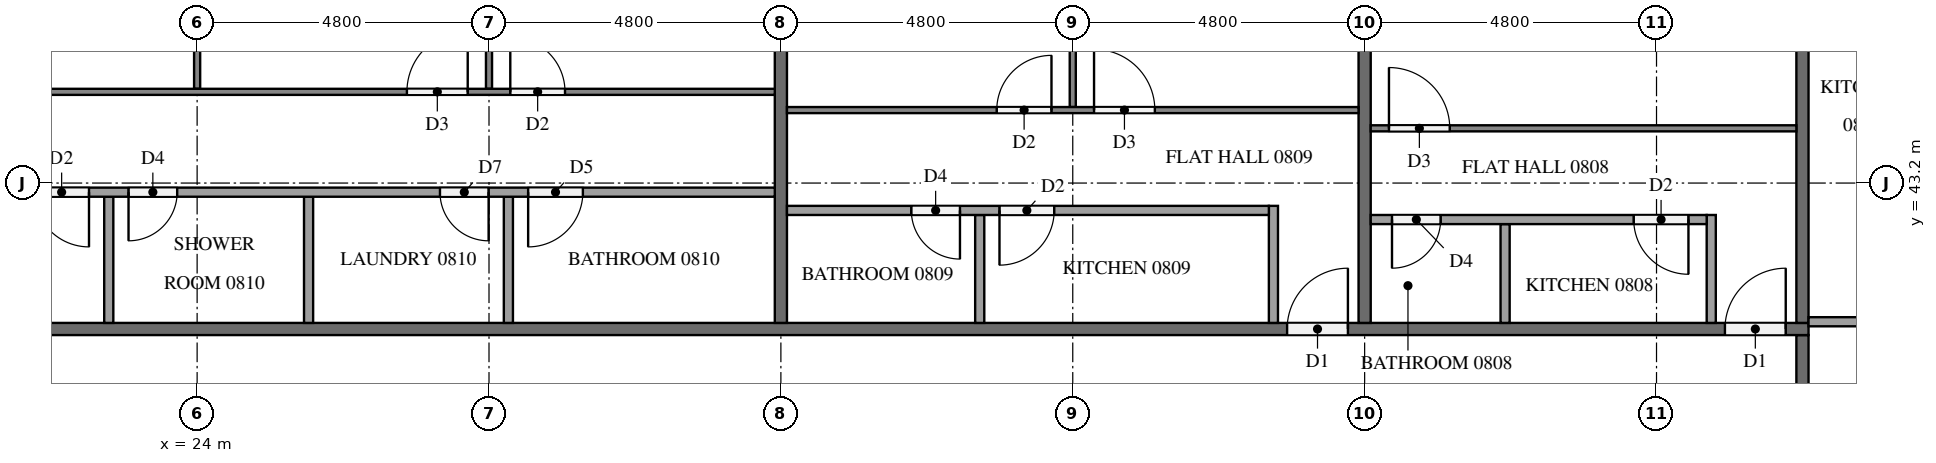
"""IFC4 building model, lengths in metres.
Left out: names, types, materials, properties, quantities, classifications, styles, units other than length and angle.
Written with IfcOpenShell. Run it as: python <this file> out.ifc"""

import sys

from ifc_helpers import new_model, si_unit, direction, frame, frame_2d, origin, place, context, subcontext, project, spatial, rectangle, extrude, element, fill, save


model = new_model("IFC4")
c1 = context("Model", 3, precision=1e-05, world=origin(), true_north=direction((0.0, 1.0)))
c2 = subcontext(c1, "Body", "Model", "MODEL_VIEW")
j1 = project(units=[si_unit("LENGTHUNIT", "METRE"), si_unit("PLANEANGLEUNIT", "RADIAN")], contexts=[c1])
p1 = place(None, origin())
s1 = spatial("IfcSite", under=j1, at=p1, CompositionType="ELEMENT")
p2 = place(p1, origin())
s2 = spatial("IfcBuilding", under=s1, at=p2, CompositionType="ELEMENT")
p3 = place(p2, frame((0.0, 0.0, 36.4)))
s3 = spatial("IfcBuildingStorey", under=s2, at=p3, CompositionType="ELEMENT", Elevation=36.4)
p4 = place(p3, frame((50.4, 40.7, 0.0), z_axis=(0.0, 0.0, 1.0), x_axis=(0.0, -1.0, 0.0)))
e1 = element("IfcWall", 1, at=p4, inside=s3, PredefinedType="PARTITIONING", context=c2, shape_type="SweptSolid", body=[
    extrude(rectangle(XDim=28.6, YDim=0.2, at=frame_2d((14.3, 0.0))), origin(), (0.0, 0.0, 1.0), 3.2),
])
p5 = place(p4, frame((27.375, 0.0, 0.0)))
e2 = element("IfcOpeningElement", 2, at=p5, cuts=e1, PredefinedType="OPENING", context=c2, shape_type="SweptSolid", body=[
    extrude(rectangle(XDim=1.1, YDim=2.1, at=frame_2d((0.55, 1.05))), frame((0.0, 0.11, 0.0), z_axis=(0.0, -1.0, 0.0), x_axis=(1.0, 0.0, 0.0)), (0.0, 0.0, 1.0), 0.22),
])
p6 = place(p4, frame((8.225, 0.0, 0.0)))
e3 = element("IfcOpeningElement", 3, at=p6, cuts=e1, PredefinedType="OPENING", context=c2, shape_type="SweptSolid", body=[
    extrude(rectangle(XDim=1.0, YDim=2.1, at=frame_2d((0.5, 1.05))), frame((0.0, 0.11, 0.0), z_axis=(0.0, -1.0, 0.0), x_axis=(1.0, 0.0, 0.0)), (0.0, 0.0, 1.0), 0.22),
])
p7 = place(p3, frame((11.9, 40.8, 0.0), z_axis=(0.0, 0.0, 1.0), x_axis=(1.0, 0.0, 0.0)))
e4 = element("IfcWall", 4, at=p7, inside=s3, PredefinedType="PARTITIONING", context=c2, shape_type="SweptSolid", body=[
    extrude(rectangle(XDim=38.6, YDim=0.2, at=frame_2d((19.3, 0.0))), origin(), (0.0, 0.0, 1.0), 3.2),
])
p8 = place(p7, frame((37.225, 0.0, 0.0)))
e5 = element("IfcOpeningElement", 5, at=p8, cuts=e4, PredefinedType="OPENING", context=c2, shape_type="SweptSolid", body=[
    extrude(rectangle(XDim=1.0, YDim=2.1, at=frame_2d((0.5, 1.05))), frame((0.0, 0.11, 0.0), z_axis=(0.0, -1.0, 0.0), x_axis=(1.0, 0.0, 0.0)), (0.0, 0.0, 1.0), 0.22),
])
p9 = place(p7, frame((30.025, 0.0, 0.0)))
e6 = element("IfcOpeningElement", 6, at=p9, cuts=e4, PredefinedType="OPENING", context=c2, shape_type="SweptSolid", body=[
    extrude(rectangle(XDim=1.0, YDim=2.1, at=frame_2d((0.5, 1.05))), frame((0.0, 0.11, 0.0), z_axis=(0.0, -1.0, 0.0), x_axis=(1.0, 0.0, 0.0)), (0.0, 0.0, 1.0), 0.22),
])
p10 = place(p7, frame((2.725, 0.0, 0.0)))
e7 = element("IfcOpeningElement", 7, at=p10, cuts=e4, PredefinedType="OPENING", context=c2, shape_type="SweptSolid", body=[
    extrude(rectangle(XDim=1.1, YDim=2.1, at=frame_2d((0.55, 1.05))), frame((0.0, 0.11, 0.0), z_axis=(0.0, -1.0, 0.0), x_axis=(1.0, 0.0, 0.0)), (0.0, 0.0, 1.0), 0.22),
])
p11 = place(p7, frame((1.225, 0.0, 0.0)))
e8 = element("IfcOpeningElement", 8, at=p11, cuts=e4, PredefinedType="OPENING", context=c2, shape_type="SweptSolid", body=[
    extrude(rectangle(XDim=1.0, YDim=2.1, at=frame_2d((0.5, 1.05))), frame((0.0, 0.11, 0.0), z_axis=(0.0, -1.0, 0.0), x_axis=(1.0, 0.0, 0.0)), (0.0, 0.0, 1.0), 0.22),
])
p12 = place(p3, frame((50.4, 40.9, 0.0), z_axis=(0.0, 0.0, 1.0), x_axis=(0.0, 1.0, 0.0)))
e9 = element("IfcWall", 9, at=p12, inside=s3, PredefinedType="PARTITIONING", context=c2, shape_type="SweptSolid", body=[
    extrude(rectangle(XDim=7.0, YDim=0.2, at=frame_2d((3.5, 0.0))), origin(), (0.0, 0.0, 1.0), 3.2),
])
for number, where, z_axis, x_axis in (
    (10, (43.2, 47.55, 0.0), (0.0, 0.0, 1.0), (0.0, -1.0, 0.0)),
    (11, (33.6, 47.55, 0.0), (0.0, 0.0, 1.0), (0.0, -1.0, 0.0)),
):
    element("IfcWall", number, at=place(p3, frame(where, z_axis=z_axis, x_axis=x_axis)), inside=s3, PredefinedType="PARTITIONING", context=c2, shape_type="SweptSolid", body=[
        extrude(rectangle(XDim=6.65, YDim=0.2, at=frame_2d((3.325, 0.0))), origin(), (0.0, 0.0, 1.0), 3.2),
    ])
p13 = place(p3, frame((50.5, 40.919, 0.0), z_axis=(0.0, 0.0, 1.0), x_axis=(1.0, 0.0, 0.0)))
e12 = element("IfcWall", 12, at=p13, inside=s3, PredefinedType="PARTITIONING", context=c2, shape_type="SweptSolid", body=[
    extrude(rectangle(XDim=1.775, YDim=0.15, at=frame_2d((0.887, 0.0))), origin(), (0.0, 0.0, 1.0), 3.2),
])
p14 = place(p3, frame((43.3, 44.1, 0.0), z_axis=(0.0, 0.0, 1.0), x_axis=(1.0, 0.0, 0.0)))
e13 = element("IfcWall", 13, at=p14, inside=s3, PredefinedType="PARTITIONING", context=c2, shape_type="SweptSolid", body=[
    extrude(rectangle(XDim=7.0, YDim=0.1, at=frame_2d((3.5, 0.0))), origin(), (0.0, 0.0, 1.0), 3.2),
])
p15 = place(p14, frame((0.3, 0.0, 0.0)))
e14 = element("IfcOpeningElement", 14, at=p15, cuts=e13, PredefinedType="OPENING", context=c2, shape_type="SweptSolid", body=[
    extrude(rectangle(XDim=1.0, YDim=2.1, at=frame_2d((0.5, 1.05))), frame((0.0, 0.06, 0.0), z_axis=(0.0, -1.0, 0.0), x_axis=(1.0, 0.0, 0.0)), (0.0, 0.0, 1.0), 0.12),
])
p16 = place(p3, frame((45.51, 40.9, 0.0), z_axis=(0.0, 0.0, 1.0), x_axis=(0.0, 1.0, 0.0)))
e15 = element("IfcWall", 15, at=p16, inside=s3, PredefinedType="PARTITIONING", context=c2, shape_type="SweptSolid", body=[
    extrude(rectangle(XDim=1.625, YDim=0.15, at=frame_2d((0.812, 0.0))), origin(), (0.0, 0.0, 1.0), 3.2),
])
p17 = place(p3, frame((48.9, 40.9, 0.0), z_axis=(0.0, 0.0, 1.0), x_axis=(0.0, 1.0, 0.0)))
e16 = element("IfcWall", 16, at=p17, inside=s3, PredefinedType="PARTITIONING", context=c2, shape_type="SweptSolid", body=[
    extrude(rectangle(XDim=1.775, YDim=0.15, at=frame_2d((0.888, 0.0))), origin(), (0.0, 0.0, 1.0), 3.2),
])
p18 = place(p3, frame((48.825, 42.6, 0.0), z_axis=(0.0, 0.0, 1.0), x_axis=(-1.0, 0.0, 0.0)))
e17 = element("IfcWall", 17, at=p18, inside=s3, PredefinedType="PARTITIONING", context=c2, shape_type="SweptSolid", body=[
    extrude(rectangle(XDim=5.525, YDim=0.15, at=frame_2d((2.762, 0.0))), origin(), (0.0, 0.0, 1.0), 3.2),
])
p19 = place(p18, frame((0.3, 0.0, 0.0)))
e18 = element("IfcOpeningElement", 18, at=p19, cuts=e17, PredefinedType="OPENING", context=c2, shape_type="SweptSolid", body=[
    extrude(rectangle(XDim=0.9, YDim=2.1, at=frame_2d((0.45, 1.05))), frame((0.0, 0.085, 0.0), z_axis=(0.0, -1.0, 0.0), x_axis=(1.0, 0.0, 0.0)), (0.0, 0.0, 1.0), 0.17),
])
p20 = place(p18, frame((4.375, 0.0, 0.0)))
e19 = element("IfcOpeningElement", 19, at=p20, cuts=e17, PredefinedType="OPENING", context=c2, shape_type="SweptSolid", body=[
    extrude(rectangle(XDim=0.8, YDim=2.1, at=frame_2d((0.4, 1.05))), frame((0.0, 0.085, 0.0), z_axis=(0.0, -1.0, 0.0), x_axis=(1.0, 0.0, 0.0)), (0.0, 0.0, 1.0), 0.17),
])
p21 = place(p3, frame((38.4, 44.45, 0.0), z_axis=(0.0, 0.0, 1.0), x_axis=(0.0, 1.0, 0.0)))
e20 = element("IfcWall", 20, at=p21, inside=s3, PredefinedType="PARTITIONING", context=c2, shape_type="SweptSolid", body=[
    extrude(rectangle(XDim=3.45, YDim=0.1, at=frame_2d((1.725, 0.0))), origin(), (0.0, 0.0, 1.0), 3.2),
])
p22 = place(p3, frame((33.7, 44.4, 0.0), z_axis=(0.0, 0.0, 1.0), x_axis=(1.0, 0.0, 0.0)))
e21 = element("IfcWall", 21, at=p22, inside=s3, PredefinedType="PARTITIONING", context=c2, shape_type="SweptSolid", body=[
    extrude(rectangle(XDim=9.4, YDim=0.1, at=frame_2d((4.7, 0.0))), origin(), (0.0, 0.0, 1.0), 3.2),
])
p23 = place(p22, frame((5.05, 0.0, 0.0)))
e22 = element("IfcOpeningElement", 22, at=p23, cuts=e21, PredefinedType="OPENING", context=c2, shape_type="SweptSolid", body=[
    extrude(rectangle(XDim=1.0, YDim=2.1, at=frame_2d((0.5, 1.05))), frame((0.0, 0.06, 0.0), z_axis=(0.0, -1.0, 0.0), x_axis=(1.0, 0.0, 0.0)), (0.0, 0.0, 1.0), 0.12),
])
p24 = place(p22, frame((3.45, 0.0, 0.0)))
e23 = element("IfcOpeningElement", 23, at=p24, cuts=e21, PredefinedType="OPENING", context=c2, shape_type="SweptSolid", body=[
    extrude(rectangle(XDim=0.9, YDim=2.1, at=frame_2d((0.45, 1.05))), frame((0.0, 0.06, 0.0), z_axis=(0.0, -1.0, 0.0), x_axis=(1.0, 0.0, 0.0)), (0.0, 0.0, 1.0), 0.12),
])
p25 = place(p3, frame((36.87, 40.9, 0.0), z_axis=(0.0, 0.0, 1.0), x_axis=(0.0, 1.0, 0.0)))
e24 = element("IfcWall", 24, at=p25, inside=s3, PredefinedType="PARTITIONING", context=c2, shape_type="SweptSolid", body=[
    extrude(rectangle(XDim=1.775, YDim=0.15, at=frame_2d((0.888, 0.0))), origin(), (0.0, 0.0, 1.0), 3.2),
])
p26 = place(p3, frame((41.7, 40.9, 0.0), z_axis=(0.0, 0.0, 1.0), x_axis=(0.0, 1.0, 0.0)))
e25 = element("IfcWall", 25, at=p26, inside=s3, PredefinedType="PARTITIONING", context=c2, shape_type="SweptSolid", body=[
    extrude(rectangle(XDim=1.925, YDim=0.15, at=frame_2d((0.962, 0.0))), origin(), (0.0, 0.0, 1.0), 3.2),
])
p27 = place(p3, frame((41.625, 42.75, 0.0), z_axis=(0.0, 0.0, 1.0), x_axis=(-1.0, 0.0, 0.0)))
e26 = element("IfcWall", 26, at=p27, inside=s3, PredefinedType="PARTITIONING", context=c2, shape_type="SweptSolid", body=[
    extrude(rectangle(XDim=7.925, YDim=0.15, at=frame_2d((3.962, 0.0))), origin(), (0.0, 0.0, 1.0), 3.2),
])
p28 = place(p27, frame((3.53, 0.0, 0.0)))
e27 = element("IfcOpeningElement", 27, at=p28, cuts=e26, PredefinedType="OPENING", context=c2, shape_type="SweptSolid", body=[
    extrude(rectangle(XDim=0.9, YDim=2.1, at=frame_2d((0.45, 1.05))), frame((0.0, 0.085, 0.0), z_axis=(0.0, -1.0, 0.0), x_axis=(1.0, 0.0, 0.0)), (0.0, 0.0, 1.0), 0.17),
])
p29 = place(p27, frame((5.08, 0.0, 0.0)))
e28 = element("IfcOpeningElement", 28, at=p29, cuts=e26, PredefinedType="OPENING", context=c2, shape_type="SweptSolid", body=[
    extrude(rectangle(XDim=0.8, YDim=2.1, at=frame_2d((0.4, 1.05))), frame((0.0, 0.085, 0.0), z_axis=(0.0, -1.0, 0.0), x_axis=(1.0, 0.0, 0.0)), (0.0, 0.0, 1.0), 0.17),
])
p30 = place(p3, frame((24.0, 44.75, 0.0), z_axis=(0.0, 0.0, 1.0), x_axis=(0.0, 1.0, 0.0)))
e29 = element("IfcWall", 29, at=p30, inside=s3, PredefinedType="PARTITIONING", context=c2, shape_type="SweptSolid", body=[
    extrude(rectangle(XDim=2.8, YDim=0.1, at=frame_2d((1.4, 0.0))), origin(), (0.0, 0.0, 1.0), 3.2),
])
p31 = place(p3, frame((28.8, 44.75, 0.0), z_axis=(0.0, 0.0, 1.0), x_axis=(0.0, 1.0, 0.0)))
e30 = element("IfcWall", 30, at=p31, inside=s3, PredefinedType="PARTITIONING", context=c2, shape_type="SweptSolid", body=[
    extrude(rectangle(XDim=3.15, YDim=0.1, at=frame_2d((1.575, 0.0))), origin(), (0.0, 0.0, 1.0), 3.2),
])
p32 = place(p3, frame((14.5, 44.7, 0.0), z_axis=(0.0, 0.0, 1.0), x_axis=(1.0, 0.0, 0.0)))
e31 = element("IfcWall", 31, at=p32, inside=s3, PredefinedType="PARTITIONING", context=c2, shape_type="SweptSolid", body=[
    extrude(rectangle(XDim=19.0, YDim=0.1, at=frame_2d((9.5, 0.0))), origin(), (0.0, 0.0, 1.0), 3.2),
])
p33 = place(p32, frame((3.45, 0.0, 0.0)))
e32 = element("IfcOpeningElement", 32, at=p33, cuts=e31, PredefinedType="OPENING", context=c2, shape_type="SweptSolid", body=[
    extrude(rectangle(XDim=0.9, YDim=2.1, at=frame_2d((0.45, 1.05))), frame((0.0, 0.06, 0.0), z_axis=(0.0, -1.0, 0.0), x_axis=(1.0, 0.0, 0.0)), (0.0, 0.0, 1.0), 0.12),
])
p34 = place(p32, frame((5.05, 0.0, 0.0)))
e33 = element("IfcOpeningElement", 33, at=p34, cuts=e31, PredefinedType="OPENING", context=c2, shape_type="SweptSolid", body=[
    extrude(rectangle(XDim=0.9, YDim=2.1, at=frame_2d((0.45, 1.05))), frame((0.0, 0.06, 0.0), z_axis=(0.0, -1.0, 0.0), x_axis=(1.0, 0.0, 0.0)), (0.0, 0.0, 1.0), 0.12),
])
p35 = place(p32, frame((12.95, 0.0, 0.0)))
e34 = element("IfcOpeningElement", 34, at=p35, cuts=e31, PredefinedType="OPENING", context=c2, shape_type="SweptSolid", body=[
    extrude(rectangle(XDim=1.0, YDim=2.1, at=frame_2d((0.5, 1.05))), frame((0.0, 0.06, 0.0), z_axis=(0.0, -1.0, 0.0), x_axis=(1.0, 0.0, 0.0)), (0.0, 0.0, 1.0), 0.12),
])
p36 = place(p32, frame((14.65, 0.0, 0.0)))
e35 = element("IfcOpeningElement", 35, at=p36, cuts=e31, PredefinedType="OPENING", context=c2, shape_type="SweptSolid", body=[
    extrude(rectangle(XDim=0.9, YDim=2.1, at=frame_2d((0.45, 1.05))), frame((0.0, 0.06, 0.0), z_axis=(0.0, -1.0, 0.0), x_axis=(1.0, 0.0, 0.0)), (0.0, 0.0, 1.0), 0.12),
])
for number, where, z_axis, x_axis in (
    (36, (22.547, 40.9, 0.0), (0.0, 0.0, 1.0), (0.0, 1.0, 0.0)),
    (37, (25.833, 40.9, 0.0), (0.0, 0.0, 1.0), (0.0, 1.0, 0.0)),
    (38, (29.119, 40.9, 0.0), (0.0, 0.0, 1.0), (0.0, 1.0, 0.0)),
):
    element("IfcWall", number, at=place(p3, frame(where, z_axis=z_axis, x_axis=x_axis)), inside=s3, PredefinedType="PARTITIONING", context=c2, shape_type="SweptSolid", body=[
        extrude(rectangle(XDim=2.075, YDim=0.15, at=frame_2d((1.038, 0.0))), origin(), (0.0, 0.0, 1.0), 3.2),
    ])
p37 = place(p3, frame((33.5, 43.05, 0.0), z_axis=(0.0, 0.0, 1.0), x_axis=(-1.0, 0.0, 0.0)))
e39 = element("IfcWall", 39, at=p37, inside=s3, PredefinedType="PARTITIONING", context=c2, shape_type="SweptSolid", body=[
    extrude(rectangle(XDim=17.525, YDim=0.15, at=frame_2d((8.762, 0.0))), origin(), (0.0, 0.0, 1.0), 3.2),
])
p38 = place(p37, frame((11.278, 0.0, 0.0)))
e40 = element("IfcOpeningElement", 40, at=p38, cuts=e39, PredefinedType="OPENING", context=c2, shape_type="SweptSolid", body=[
    extrude(rectangle(XDim=0.9, YDim=2.1, at=frame_2d((0.45, 1.05))), frame((0.0, 0.085, 0.0), z_axis=(0.0, -1.0, 0.0), x_axis=(1.0, 0.0, 0.0)), (0.0, 0.0, 1.0), 0.17),
])
p39 = place(p37, frame((9.828, 0.0, 0.0)))
e41 = element("IfcOpeningElement", 41, at=p39, cuts=e39, PredefinedType="OPENING", context=c2, shape_type="SweptSolid", body=[
    extrude(rectangle(XDim=0.8, YDim=2.1, at=frame_2d((0.4, 1.05))), frame((0.0, 0.085, 0.0), z_axis=(0.0, -1.0, 0.0), x_axis=(1.0, 0.0, 0.0)), (0.0, 0.0, 1.0), 0.17),
])
p40 = place(p37, frame((4.706, 0.0, 0.0)))
e42 = element("IfcOpeningElement", 42, at=p40, cuts=e39, PredefinedType="OPENING", context=c2, shape_type="SweptSolid", body=[
    extrude(rectangle(XDim=0.8, YDim=2.1, at=frame_2d((0.4, 1.05))), frame((0.0, 0.085, 0.0), z_axis=(0.0, -1.0, 0.0), x_axis=(1.0, 0.0, 0.0)), (0.0, 0.0, 1.0), 0.17),
])
p41 = place(p37, frame((3.156, 0.0, 0.0)))
e43 = element("IfcOpeningElement", 43, at=p41, cuts=e39, PredefinedType="OPENING", context=c2, shape_type="SweptSolid", body=[
    extrude(rectangle(XDim=0.9, YDim=2.1, at=frame_2d((0.45, 1.05))), frame((0.0, 0.085, 0.0), z_axis=(0.0, -1.0, 0.0), x_axis=(1.0, 0.0, 0.0)), (0.0, 0.0, 1.0), 0.17),
])
p42 = place(p8, origin())
e44 = element("IfcDoor", 44, at=p42, inside=s3, OperationType="SINGLE_SWING_RIGHT", PredefinedType="DOOR", context=c2, shape_type="SweptSolid", body=[
    extrude(rectangle(XDim=1.0, YDim=2.1, at=frame_2d((0.5, 1.05))), frame((0.0, 0.025, 0.0), z_axis=(0.0, -1.0, 0.0), x_axis=(1.0, 0.0, 0.0)), (0.0, 0.0, 1.0), 0.05),
])
fill(e5, e44)
p43 = place(p9, origin())
e45 = element("IfcDoor", 45, at=p43, inside=s3, OperationType="SINGLE_SWING_RIGHT", PredefinedType="DOOR", context=c2, shape_type="SweptSolid", body=[
    extrude(rectangle(XDim=1.0, YDim=2.1, at=frame_2d((0.5, 1.05))), frame((0.0, 0.025, 0.0), z_axis=(0.0, -1.0, 0.0), x_axis=(1.0, 0.0, 0.0)), (0.0, 0.0, 1.0), 0.05),
])
fill(e6, e45)
p44 = place(p15, origin())
e46 = element("IfcDoor", 46, at=p44, inside=s3, OperationType="SINGLE_SWING_LEFT", PredefinedType="DOOR", context=c2, shape_type="SweptSolid", body=[
    extrude(rectangle(XDim=1.0, YDim=2.1, at=frame_2d((0.5, 1.05))), frame((0.0, 0.025, 0.0), z_axis=(0.0, -1.0, 0.0), x_axis=(1.0, 0.0, 0.0)), (0.0, 0.0, 1.0), 0.05),
])
fill(e14, e46)
p45 = place(p19, origin())
e47 = element("IfcDoor", 47, at=p45, inside=s3, OperationType="SINGLE_SWING_LEFT", PredefinedType="DOOR", context=c2, shape_type="SweptSolid", body=[
    extrude(rectangle(XDim=0.9, YDim=2.1, at=frame_2d((0.45, 1.05))), frame((0.0, 0.025, 0.0), z_axis=(0.0, -1.0, 0.0), x_axis=(1.0, 0.0, 0.0)), (0.0, 0.0, 1.0), 0.05),
])
fill(e18, e47)
p46 = place(p20, origin())
e48 = element("IfcDoor", 48, at=p46, inside=s3, OperationType="SINGLE_SWING_RIGHT", PredefinedType="DOOR", context=c2, shape_type="SweptSolid", body=[
    extrude(rectangle(XDim=0.8, YDim=2.1, at=frame_2d((0.4, 1.05))), frame((0.0, 0.025, 0.0), z_axis=(0.0, -1.0, 0.0), x_axis=(1.0, 0.0, 0.0)), (0.0, 0.0, 1.0), 0.05),
])
fill(e19, e48)
p47 = place(p23, origin())
e49 = element("IfcDoor", 49, at=p47, inside=s3, OperationType="SINGLE_SWING_LEFT", PredefinedType="DOOR", context=c2, shape_type="SweptSolid", body=[
    extrude(rectangle(XDim=1.0, YDim=2.1, at=frame_2d((0.5, 1.05))), frame((0.0, 0.025, 0.0), z_axis=(0.0, -1.0, 0.0), x_axis=(1.0, 0.0, 0.0)), (0.0, 0.0, 1.0), 0.05),
])
fill(e22, e49)
p48 = place(p24, origin())
e50 = element("IfcDoor", 50, at=p48, inside=s3, OperationType="SINGLE_SWING_RIGHT", PredefinedType="DOOR", context=c2, shape_type="SweptSolid", body=[
    extrude(rectangle(XDim=0.9, YDim=2.1, at=frame_2d((0.45, 1.05))), frame((0.0, 0.025, 0.0), z_axis=(0.0, -1.0, 0.0), x_axis=(1.0, 0.0, 0.0)), (0.0, 0.0, 1.0), 0.05),
])
fill(e23, e50)
p49 = place(p28, origin())
e51 = element("IfcDoor", 51, at=p49, inside=s3, OperationType="SINGLE_SWING_RIGHT", PredefinedType="DOOR", context=c2, shape_type="SweptSolid", body=[
    extrude(rectangle(XDim=0.9, YDim=2.1, at=frame_2d((0.45, 1.05))), frame((0.0, 0.025, 0.0), z_axis=(0.0, -1.0, 0.0), x_axis=(1.0, 0.0, 0.0)), (0.0, 0.0, 1.0), 0.05),
])
fill(e27, e51)
p50 = place(p29, origin())
e52 = element("IfcDoor", 52, at=p50, inside=s3, OperationType="SINGLE_SWING_LEFT", PredefinedType="DOOR", context=c2, shape_type="SweptSolid", body=[
    extrude(rectangle(XDim=0.8, YDim=2.1, at=frame_2d((0.4, 1.05))), frame((0.0, 0.025, 0.0), z_axis=(0.0, -1.0, 0.0), x_axis=(1.0, 0.0, 0.0)), (0.0, 0.0, 1.0), 0.05),
])
fill(e28, e52)
p51 = place(p35, origin())
e53 = element("IfcDoor", 53, at=p51, inside=s3, OperationType="SINGLE_SWING_RIGHT", PredefinedType="DOOR", context=c2, shape_type="SweptSolid", body=[
    extrude(rectangle(XDim=1.0, YDim=2.1, at=frame_2d((0.5, 1.05))), frame((0.0, 0.025, 0.0), z_axis=(0.0, -1.0, 0.0), x_axis=(1.0, 0.0, 0.0)), (0.0, 0.0, 1.0), 0.05),
])
fill(e34, e53)
p52 = place(p36, origin())
e54 = element("IfcDoor", 54, at=p52, inside=s3, OperationType="SINGLE_SWING_LEFT", PredefinedType="DOOR", context=c2, shape_type="SweptSolid", body=[
    extrude(rectangle(XDim=0.9, YDim=2.1, at=frame_2d((0.45, 1.05))), frame((0.0, 0.025, 0.0), z_axis=(0.0, -1.0, 0.0), x_axis=(1.0, 0.0, 0.0)), (0.0, 0.0, 1.0), 0.05),
])
fill(e35, e54)
p53 = place(p38, origin())
e55 = element("IfcDoor", 55, at=p53, inside=s3, OperationType="SINGLE_SWING_LEFT", PredefinedType="DOOR", context=c2, shape_type="SweptSolid", body=[
    extrude(rectangle(XDim=0.9, YDim=2.1, at=frame_2d((0.45, 1.05))), frame((0.0, 0.025, 0.0), z_axis=(0.0, -1.0, 0.0), x_axis=(1.0, 0.0, 0.0)), (0.0, 0.0, 1.0), 0.05),
])
fill(e40, e55)
p54 = place(p39, origin())
e56 = element("IfcDoor", 56, at=p54, inside=s3, OperationType="SINGLE_SWING_RIGHT", PredefinedType="DOOR", context=c2, shape_type="SweptSolid", body=[
    extrude(rectangle(XDim=0.8, YDim=2.1, at=frame_2d((0.4, 1.05))), frame((0.0, 0.025, 0.0), z_axis=(0.0, -1.0, 0.0), x_axis=(1.0, 0.0, 0.0)), (0.0, 0.0, 1.0), 0.05),
])
fill(e41, e56)
p55 = place(p40, origin())
e57 = element("IfcDoor", 57, at=p55, inside=s3, OperationType="SINGLE_SWING_LEFT", PredefinedType="DOOR", context=c2, shape_type="SweptSolid", body=[
    extrude(rectangle(XDim=0.8, YDim=2.1, at=frame_2d((0.4, 1.05))), frame((0.0, 0.025, 0.0), z_axis=(0.0, -1.0, 0.0), x_axis=(1.0, 0.0, 0.0)), (0.0, 0.0, 1.0), 0.05),
])
fill(e42, e57)
p56 = place(p41, origin())
e58 = element("IfcDoor", 58, at=p56, inside=s3, OperationType="SINGLE_SWING_RIGHT", PredefinedType="DOOR", context=c2, shape_type="SweptSolid", body=[
    extrude(rectangle(XDim=0.9, YDim=2.1, at=frame_2d((0.45, 1.05))), frame((0.0, 0.025, 0.0), z_axis=(0.0, -1.0, 0.0), x_axis=(1.0, 0.0, 0.0)), (0.0, 0.0, 1.0), 0.05),
])
fill(e43, e58)
save(model, sys.argv[1])
